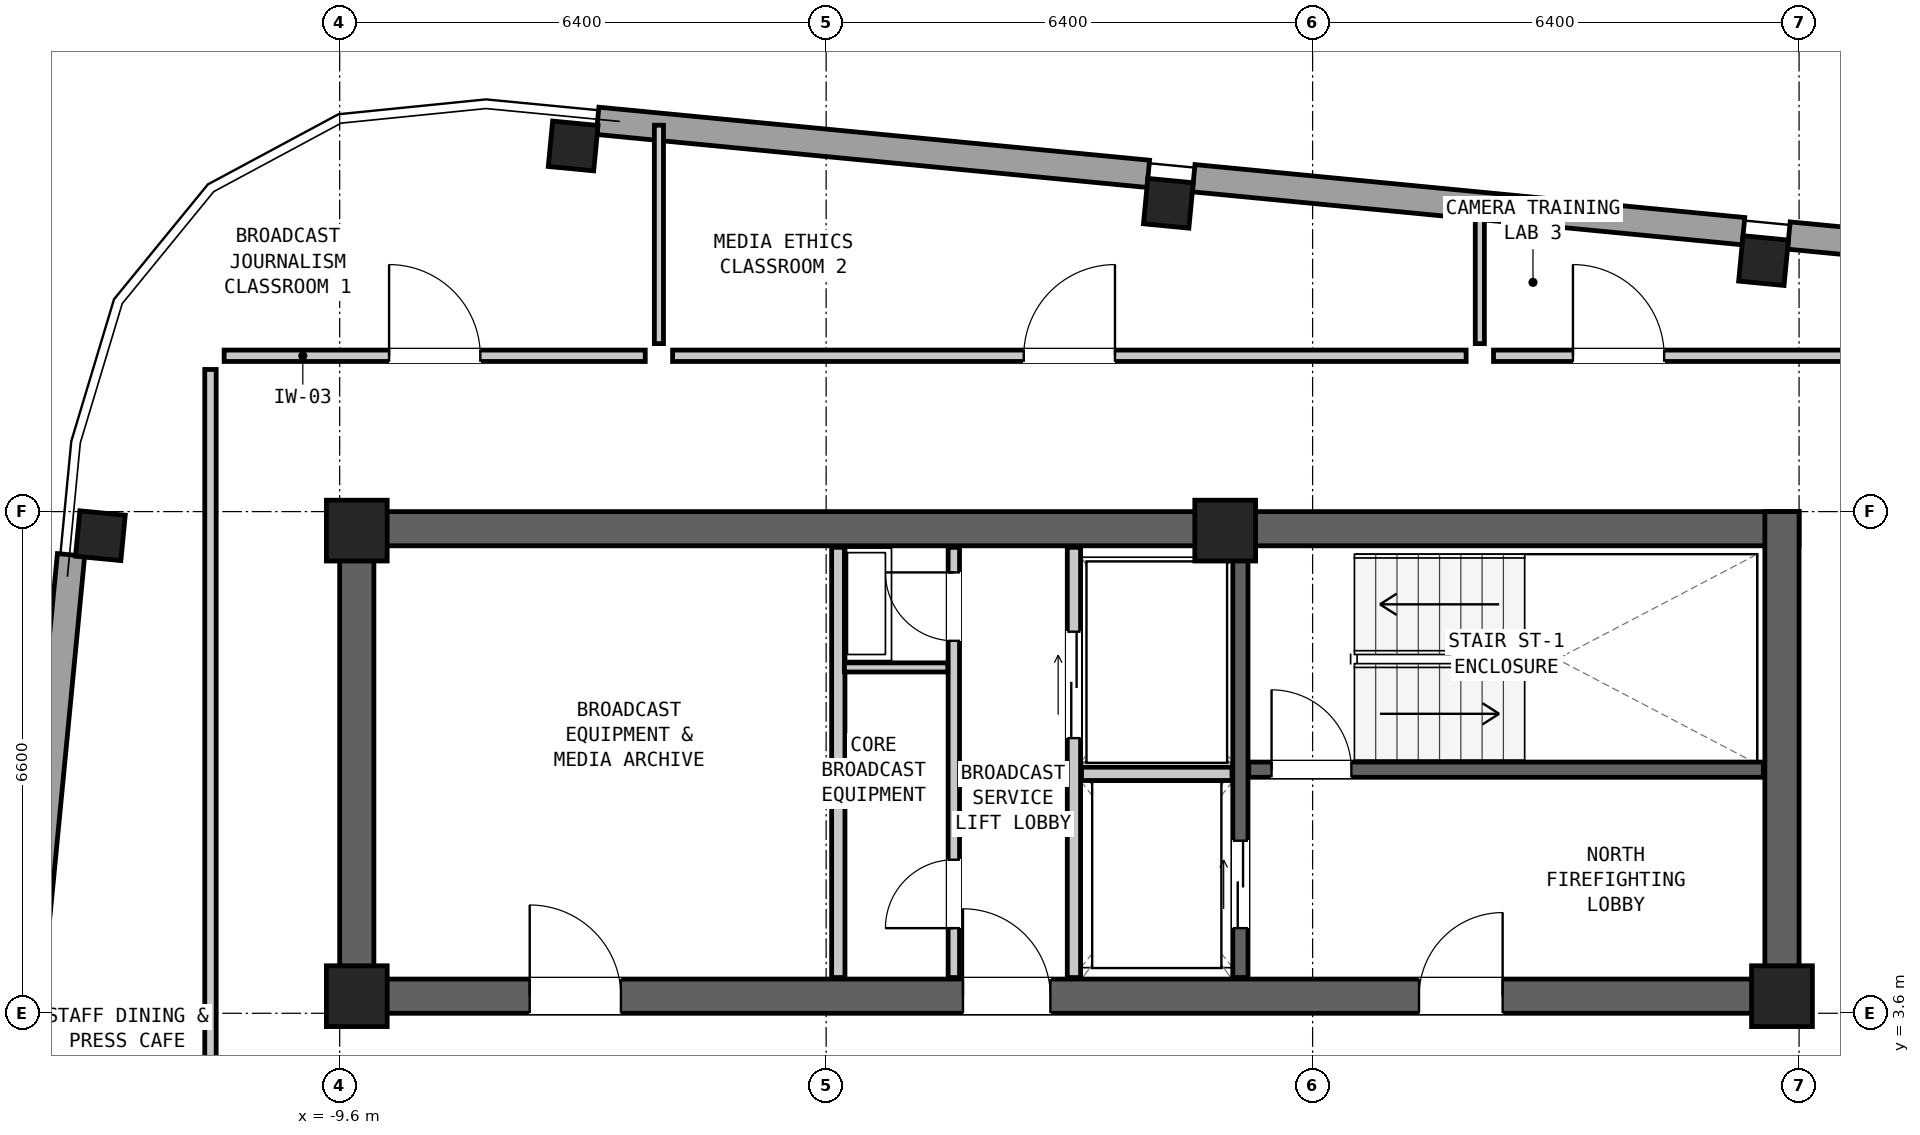
"""IFC4 building model, lengths in metres.
Left out: names, types, materials, properties, quantities, classifications, styles, units other than length and angle.
Written with IfcOpenShell. Run it as: python <this file> out.ifc"""

import sys

from ifc_helpers import new_model, si_unit, direction, frame, frame_2d, origin, origin_2d, place, context, subcontext, project, spatial, rectangle, hollow_rectangle, extrude, element, fill, save


model = new_model("IFC4")
c1 = context("Model", 3, precision=1e-05, world=origin(), true_north=direction((0.0, 1.0)))
c2 = subcontext(c1, "Body", "Model", "MODEL_VIEW")
j1 = project(units=[si_unit("LENGTHUNIT", "METRE"), si_unit("PLANEANGLEUNIT", "RADIAN")], contexts=[c1])
p1 = place(None, origin())
s1 = spatial("IfcSite", under=j1, at=p1, CompositionType="ELEMENT")
p2 = place(p1, origin())
s2 = spatial("IfcBuilding", under=s1, at=p2, CompositionType="ELEMENT")
p3 = place(p2, frame((0.0, 0.0, 267.25)))
s3 = spatial("IfcBuildingStorey", under=s2, at=p3, CompositionType="ELEMENT", Elevation=267.25)
p4 = place(p3, frame((-9.6, 9.975, 0.0), z_axis=(0.0, 0.0, 1.0), x_axis=(1.0, 0.0, 0.0)))
e1 = element("IfcWall", 1, at=p4, inside=s3, PredefinedType="SHEAR", context=c2, shape_type="SweptSolid", body=[
    extrude(rectangle(XDim=19.2, YDim=0.45, at=frame_2d((9.6, 0.0))), origin(), (0.0, 0.0, 1.0), 3.05),
])
p5 = place(p3, frame((-9.6, 3.825, 0.0), z_axis=(0.0, 0.0, 1.0), x_axis=(1.0, 0.0, 0.0)))
e2 = element("IfcWall", 2, at=p5, inside=s3, PredefinedType="SHEAR", context=c2, shape_type="SweptSolid", body=[
    extrude(rectangle(XDim=19.2, YDim=0.45, at=frame_2d((9.6, 0.0))), origin(), (0.0, 0.0, 1.0), 3.05),
])
p6 = place(p5, frame((14.2, 0.0, 0.0)))
e3 = element("IfcOpeningElement", 3, at=p6, cuts=e2, PredefinedType="OPENING", context=c2, shape_type="SweptSolid", body=[
    extrude(rectangle(XDim=1.1, YDim=2.08, at=frame_2d((0.55, 1.04))), frame((0.0, 0.237, 0.0), z_axis=(0.0, -1.0, 0.0), x_axis=(1.0, 0.0, 0.0)), (0.0, 0.0, 1.0), 0.474),
])
p7 = place(p5, frame((8.2, 0.0, 0.0)))
e4 = element("IfcOpeningElement", 4, at=p7, cuts=e2, PredefinedType="OPENING", context=c2, shape_type="SweptSolid", body=[
    extrude(rectangle(XDim=1.15, YDim=2.1, at=frame_2d((0.575, 1.05))), frame((0.0, 0.237, 0.0), z_axis=(0.0, -1.0, 0.0), x_axis=(1.0, 0.0, 0.0)), (0.0, 0.0, 1.0), 0.474),
])
p8 = place(p5, frame((2.5, 0.0, 0.0)))
e5 = element("IfcOpeningElement", 5, at=p8, cuts=e2, PredefinedType="OPENING", context=c2, shape_type="SweptSolid", body=[
    extrude(rectangle(XDim=1.2, YDim=2.1, at=frame_2d((0.6, 1.05))), frame((0.0, 0.237, 0.0), z_axis=(0.0, -1.0, 0.0), x_axis=(1.0, 0.0, 0.0)), (0.0, 0.0, 1.0), 0.474),
])
for number, where, z_axis, x_axis in (
    (6, (-9.375, 3.6, 0.0), (0.0, 0.0, 1.0), (0.0, 1.0, 0.0)),
    (7, (9.375, 3.6, 0.0), (0.0, 0.0, 1.0), (0.0, 1.0, 0.0)),
):
    element("IfcWall", number, at=place(p3, frame(where, z_axis=z_axis, x_axis=x_axis)), inside=s3, PredefinedType="SHEAR", context=c2, shape_type="SweptSolid", body=[
        extrude(rectangle(XDim=6.6, YDim=0.45, at=frame_2d((3.3, 0.0))), origin(), (0.0, 0.0, 1.0), 3.05),
    ])
for number, where, z_axis, x_axis in (
    (8, (9.133, 13.502, 0.0), (0.0, 0.0, 1.0), (0.995, -0.096, 0.0)),
    (9, (1.302, 14.256, 0.0), (0.0, 0.0, 1.0), (0.995, -0.096, 0.0)),
    (10, (-6.528, 15.01, 0.0), (0.0, 0.0, 1.0), (0.995, -0.096, 0.0)),
    (11, (-12.749, 9.883, 0.0), (0.0, 0.0, 1.0), (0.096, 0.995, 0.0)),
):
    element("IfcColumn", number, at=place(p3, frame(where, z_axis=z_axis, x_axis=x_axis)), inside=s3, PredefinedType="COLUMN", context=c2, shape_type="SweptSolid", body=[
        extrude(hollow_rectangle(XDim=0.6, YDim=0.6, WallThickness=0.04, at=origin_2d()), origin(), (0.0, 0.0, 1.0), 3.05),
    ])
for number, where, z_axis, x_axis in (
    (12, (-9.375, 9.95, 0.0), (0.0, 0.0, 1.0), (1.0, 0.0, 0.0)),
    (13, (2.05, 9.95, 0.0), (0.0, 0.0, 1.0), (1.0, 0.0, 0.0)),
    (14, (-9.375, 3.825, 0.0), (0.0, 0.0, 1.0), (1.0, 0.0, 0.0)),
    (15, (9.375, 3.825, 0.0), (0.0, 0.0, 1.0), (1.0, 0.0, 0.0)),
):
    element("IfcColumn", number, at=place(p3, frame(where, z_axis=z_axis, x_axis=x_axis)), inside=s3, PredefinedType="COLUMN", context=c2, shape_type="SweptSolid", body=[
        extrude(rectangle(XDim=0.8, YDim=0.8, at=origin_2d()), origin(), (0.0, 0.0, 1.0), 3.05),
    ])
p9 = place(p3, frame((-6.207, 15.341, 0.0), z_axis=(0.0, 0.0, 1.0), x_axis=(0.99539482255, -0.095860039857, 0.0)))
e16 = element("IfcWall", 16, at=p9, inside=s3, PredefinedType="SOLIDWALL", context=c2, shape_type="SweptSolid", body=[
    extrude(rectangle(XDim=7.279, YDim=0.36, at=frame_2d((3.639, 0.0))), origin(), (0.0, 0.0, 1.0), 0.98),
])
p10 = place(p3, frame((1.635, 14.586, 0.0), z_axis=(0.0, 0.0, 1.0), x_axis=(0.995398620126, -0.095820598258, 0.0)))
e17 = element("IfcWall", 17, at=p10, inside=s3, PredefinedType="SOLIDWALL", context=c2, shape_type="SweptSolid", body=[
    extrude(rectangle(XDim=7.267, YDim=0.36, at=frame_2d((3.633, 0.0))), origin(), (0.0, 0.0, 1.0), 0.98),
])
p11 = place(p3, frame((9.466, 13.832, 0.0), z_axis=(0.0, 0.0, 1.0), x_axis=(0.99539771442, -0.095830006406, 0.0)))
e18 = element("IfcWall", 18, at=p11, inside=s3, PredefinedType="SOLIDWALL", context=c2, shape_type="SweptSolid", body=[
    extrude(rectangle(XDim=7.279, YDim=0.36, at=frame_2d((3.639, 0.0))), origin(), (0.0, 0.0, 1.0), 0.98),
])
p12 = place(p3, frame((-13.832, 2.385, 0.0), z_axis=(0.0, 0.0, 1.0), x_axis=(0.095826806958, 0.995398022435, 0.0)))
e19 = element("IfcWall", 19, at=p12, inside=s3, PredefinedType="SOLIDWALL", context=c2, shape_type="SweptSolid", body=[
    extrude(rectangle(XDim=7.279, YDim=0.36, at=frame_2d((3.639, 0.0))), origin(), (0.0, 0.0, 1.0), 0.98),
])
p13 = place(p3, frame((2.36, 6.805, 0.0), z_axis=(0.0, 0.0, 1.0), x_axis=(1.0, 0.0, 0.0)))
e20 = element("IfcWall", 20, at=p13, inside=s3, PredefinedType="SHEAR", context=c2, shape_type="SweptSolid", body=[
    extrude(rectangle(XDim=6.77, YDim=0.2, at=frame_2d((3.385, 0.0))), origin(), (0.0, 0.0, 1.0), 2.86),
])
p14 = place(p13, frame((0.3, 0.0, 0.0)))
e21 = element("IfcOpeningElement", 21, at=p14, cuts=e20, PredefinedType="OPENING", context=c2, shape_type="SweptSolid", body=[
    extrude(rectangle(XDim=1.05, YDim=2.08, at=frame_2d((0.525, 1.04))), frame((0.0, 0.112, 0.0), z_axis=(0.0, -1.0, 0.0), x_axis=(1.0, 0.0, 0.0)), (0.0, 0.0, 1.0), 0.224),
])
p15 = place(p3, frame((2.25, 4.07, 0.0), z_axis=(0.0, 0.0, 1.0), x_axis=(0.0, 1.0, 0.0)))
e22 = element("IfcWall", 22, at=p15, inside=s3, PredefinedType="SHEAR", context=c2, shape_type="SweptSolid", body=[
    extrude(rectangle(XDim=5.66, YDim=0.2, at=frame_2d((2.83, 0.0))), origin(), (0.0, 0.0, 1.0), 2.86),
])
p16 = place(p15, frame((0.65, 0.0, 0.0)))
e23 = element("IfcOpeningElement", 23, at=p16, cuts=e22, PredefinedType="OPENING", context=c2, shape_type="SweptSolid", body=[
    extrude(rectangle(XDim=1.15, YDim=2.08, at=frame_2d((0.575, 1.04))), frame((0.0, 0.112, 0.0), z_axis=(0.0, -1.0, 0.0), x_axis=(1.0, 0.0, 0.0)), (0.0, 0.0, 1.0), 0.224),
])
p17 = place(p3, frame((0.06, 4.07, 0.0), z_axis=(0.0, 0.0, 1.0), x_axis=(0.0, 1.0, 0.0)))
e24 = element("IfcWall", 24, at=p17, inside=s3, PredefinedType="PARTITIONING", context=c2, shape_type="SweptSolid", body=[
    extrude(rectangle(XDim=5.66, YDim=0.175, at=frame_2d((2.83, 0.0))), origin(), (0.0, 0.0, 1.0), 2.86),
])
p18 = place(p17, frame((3.15, 0.0, 0.0)))
e25 = element("IfcOpeningElement", 25, at=p18, cuts=e24, PredefinedType="OPENING", context=c2, shape_type="SweptSolid", body=[
    extrude(rectangle(XDim=1.4, YDim=2.12, at=frame_2d((0.7, 1.06))), frame((0.0, 0.1, 0.0), z_axis=(0.0, -1.0, 0.0), x_axis=(1.0, 0.0, 0.0)), (0.0, 0.0, 1.0), 0.199),
])
p19 = place(p3, frame((0.16, 6.75, 0.0), z_axis=(0.0, 0.0, 1.0), x_axis=(1.0, 0.0, 0.0)))
e26 = element("IfcWall", 26, at=p19, inside=s3, PredefinedType="PARTITIONING", context=c2, shape_type="SweptSolid", body=[
    extrude(rectangle(XDim=1.98, YDim=0.175, at=frame_2d((0.99, 0.0))), origin(), (0.0, 0.0, 1.0), 2.86),
])
p20 = place(p3, frame((-3.04, 4.07, 0.0), z_axis=(0.0, 0.0, 1.0), x_axis=(0.0, 1.0, 0.0)))
e27 = element("IfcWall", 27, at=p20, inside=s3, PredefinedType="PARTITIONING", context=c2, shape_type="SweptSolid", body=[
    extrude(rectangle(XDim=5.66, YDim=0.175, at=frame_2d((2.83, 0.0))), origin(), (0.0, 0.0, 1.0), 2.86),
])
p21 = place(p3, frame((-1.52, 4.07, 0.0), z_axis=(0.0, 0.0, 1.0), x_axis=(0.0, 1.0, 0.0)))
e28 = element("IfcWall", 28, at=p21, inside=s3, PredefinedType="PARTITIONING", context=c2, shape_type="SweptSolid", body=[
    extrude(rectangle(XDim=5.66, YDim=0.15, at=frame_2d((2.83, 0.0))), origin(), (0.0, 0.0, 1.0), 2.86),
])
p22 = place(p21, frame((4.43, 0.0, 0.0)))
e29 = element("IfcOpeningElement", 29, at=p22, cuts=e28, PredefinedType="OPENING", context=c2, shape_type="SweptSolid", body=[
    extrude(rectangle(XDim=0.9, YDim=2.05, at=frame_2d((0.45, 1.025))), frame((0.0, 0.087, 0.0), z_axis=(0.0, -1.0, 0.0), x_axis=(1.0, 0.0, 0.0)), (0.0, 0.0, 1.0), 0.174),
])
p23 = place(p21, frame((0.65, 0.0, 0.0)))
e30 = element("IfcOpeningElement", 30, at=p23, cuts=e28, PredefinedType="OPENING", context=c2, shape_type="SweptSolid", body=[
    extrude(rectangle(XDim=0.9, YDim=2.05, at=frame_2d((0.45, 1.025))), frame((0.0, 0.087, 0.0), z_axis=(0.0, -1.0, 0.0), x_axis=(1.0, 0.0, 0.0)), (0.0, 0.0, 1.0), 0.174),
])
p24 = place(p3, frame((-2.96, 8.15, 0.0), z_axis=(0.0, 0.0, 1.0), x_axis=(1.0, 0.0, 0.0)))
e31 = element("IfcWall", 31, at=p24, inside=s3, PredefinedType="PARTITIONING", context=c2, shape_type="SweptSolid", body=[
    extrude(rectangle(XDim=1.36, YDim=0.12, at=frame_2d((0.68, 0.0))), origin(), (0.0, 0.0, 1.0), 2.86),
])
p25 = place(p3, frame((-5.4, 12.41, 0.0), z_axis=(0.0, 0.0, 1.0), x_axis=(0.0, 1.0, 0.0)))
e32 = element("IfcWall", 32, at=p25, inside=s3, PredefinedType="PARTITIONING", context=c2, shape_type="SweptSolid", body=[
    extrude(rectangle(XDim=2.874, YDim=0.12, at=frame_2d((1.437, 0.0))), origin(), (0.0, 0.0, 1.0), 2.86),
])
p26 = place(p3, frame((5.4, 12.41, 0.0), z_axis=(0.0, 0.0, 1.0), x_axis=(0.0, 1.0, 0.0)))
e33 = element("IfcWall", 33, at=p26, inside=s3, PredefinedType="PARTITIONING", context=c2, shape_type="SweptSolid", body=[
    extrude(rectangle(XDim=1.834, YDim=0.12, at=frame_2d((0.917, 0.0))), origin(), (0.0, 0.0, 1.0), 2.86),
])
p27 = place(p3, frame((-11.12, 12.25, 0.0), z_axis=(0.0, 0.0, 1.0), x_axis=(1.0, 0.0, 0.0)))
e34 = element("IfcWall", 34, at=p27, inside=s3, PredefinedType="PARTITIONING", context=c2, shape_type="SweptSolid", body=[
    extrude(rectangle(XDim=5.54, YDim=0.15, at=frame_2d((2.77, 0.0))), origin(), (0.0, 0.0, 1.0), 2.86),
])
p28 = place(p27, frame((2.17, 0.0, 0.0)))
e35 = element("IfcOpeningElement", 35, at=p28, cuts=e34, PredefinedType="OPENING", context=c2, shape_type="SweptSolid", body=[
    extrude(rectangle(XDim=1.2, YDim=2.1, at=frame_2d((0.6, 1.05))), frame((0.0, 0.087, 0.0), z_axis=(0.0, -1.0, 0.0), x_axis=(1.0, 0.0, 0.0)), (0.0, 0.0, 1.0), 0.174),
])
p29 = place(p3, frame((-5.22, 12.25, 0.0), z_axis=(0.0, 0.0, 1.0), x_axis=(1.0, 0.0, 0.0)))
e36 = element("IfcWall", 36, at=p29, inside=s3, PredefinedType="PARTITIONING", context=c2, shape_type="SweptSolid", body=[
    extrude(rectangle(XDim=10.44, YDim=0.15, at=frame_2d((5.22, 0.0))), origin(), (0.0, 0.0, 1.0), 2.86),
])
p30 = place(p29, frame((4.62, 0.0, 0.0)))
e37 = element("IfcOpeningElement", 37, at=p30, cuts=e36, PredefinedType="OPENING", context=c2, shape_type="SweptSolid", body=[
    extrude(rectangle(XDim=1.2, YDim=2.1, at=frame_2d((0.6, 1.05))), frame((0.0, 0.087, 0.0), z_axis=(0.0, -1.0, 0.0), x_axis=(1.0, 0.0, 0.0)), (0.0, 0.0, 1.0), 0.174),
])
p31 = place(p3, frame((5.58, 12.25, 0.0), z_axis=(0.0, 0.0, 1.0), x_axis=(1.0, 0.0, 0.0)))
e38 = element("IfcWall", 38, at=p31, inside=s3, PredefinedType="PARTITIONING", context=c2, shape_type="SweptSolid", body=[
    extrude(rectangle(XDim=5.89, YDim=0.15, at=frame_2d((2.945, 0.0))), origin(), (0.0, 0.0, 1.0), 2.86),
])
p32 = place(p31, frame((1.045, 0.0, 0.0)))
e39 = element("IfcOpeningElement", 39, at=p32, cuts=e38, PredefinedType="OPENING", context=c2, shape_type="SweptSolid", body=[
    extrude(rectangle(XDim=1.2, YDim=2.1, at=frame_2d((0.6, 1.05))), frame((0.0, 0.087, 0.0), z_axis=(0.0, -1.0, 0.0), x_axis=(1.0, 0.0, 0.0)), (0.0, 0.0, 1.0), 0.174),
])
p33 = place(p3, frame((-11.3, 12.07, 0.0), z_axis=(0.0, 0.0, 1.0), x_axis=(0.0, -1.0, 0.0)))
e40 = element("IfcWall", 40, at=p33, inside=s3, PredefinedType="PARTITIONING", context=c2, shape_type="SweptSolid", body=[
    extrude(rectangle(XDim=11.89, YDim=0.15, at=frame_2d((5.945, 0.0))), origin(), (0.0, 0.0, 1.0), 2.86),
])
p34 = place(p33, frame((9.625, 0.0, 0.0)))
e41 = element("IfcOpeningElement", 41, at=p34, cuts=e40, PredefinedType="OPENING", context=c2, shape_type="SweptSolid", body=[
    extrude(rectangle(XDim=1.2, YDim=2.1, at=frame_2d((0.6, 1.05))), frame((0.0, 0.087, 0.0), z_axis=(0.0, -1.0, 0.0), x_axis=(1.0, 0.0, 0.0)), (0.0, 0.0, 1.0), 0.174),
])
p35 = place(p14, origin())
e42 = element("IfcDoor", 42, at=p35, inside=s3, OperationType="SINGLE_SWING_LEFT", PredefinedType="DOOR", context=c2, shape_type="SweptSolid", body=[
    extrude(rectangle(XDim=1.05, YDim=2.08, at=frame_2d((0.525, 1.04))), frame((0.0, 0.025, 0.0), z_axis=(0.0, -1.0, 0.0), x_axis=(1.0, 0.0, 0.0)), (0.0, 0.0, 1.0), 0.05),
])
fill(e21, e42)
p36 = place(p6, origin())
e43 = element("IfcDoor", 43, at=p36, inside=s3, OperationType="SINGLE_SWING_RIGHT", PredefinedType="DOOR", context=c2, shape_type="SweptSolid", body=[
    extrude(rectangle(XDim=1.1, YDim=2.08, at=frame_2d((0.55, 1.04))), frame((0.0, 0.025, 0.0), z_axis=(0.0, -1.0, 0.0), x_axis=(1.0, 0.0, 0.0)), (0.0, 0.0, 1.0), 0.05),
])
fill(e3, e43)
p37 = place(p16, origin())
e44 = element("IfcDoor", 44, at=p37, inside=s3, OperationType="DOUBLE_DOOR_SLIDING", PredefinedType="DOOR", context=c2, shape_type="SweptSolid", body=[
    extrude(rectangle(XDim=1.15, YDim=2.08, at=frame_2d((0.575, 1.04))), frame((0.0, 0.025, 0.0), z_axis=(0.0, -1.0, 0.0), x_axis=(1.0, 0.0, 0.0)), (0.0, 0.0, 1.0), 0.05),
])
fill(e23, e44)
p38 = place(p18, origin())
e45 = element("IfcDoor", 45, at=p38, inside=s3, OperationType="DOUBLE_DOOR_SLIDING", PredefinedType="DOOR", context=c2, shape_type="SweptSolid", body=[
    extrude(rectangle(XDim=1.4, YDim=2.12, at=frame_2d((0.7, 1.06))), frame((0.0, 0.025, 0.0), z_axis=(0.0, -1.0, 0.0), x_axis=(1.0, 0.0, 0.0)), (0.0, 0.0, 1.0), 0.05),
])
fill(e25, e45)
p39 = place(p7, origin())
e46 = element("IfcDoor", 46, at=p39, inside=s3, OperationType="SINGLE_SWING_LEFT", PredefinedType="DOOR", context=c2, shape_type="SweptSolid", body=[
    extrude(rectangle(XDim=1.15, YDim=2.1, at=frame_2d((0.575, 1.05))), frame((0.0, 0.025, 0.0), z_axis=(0.0, -1.0, 0.0), x_axis=(1.0, 0.0, 0.0)), (0.0, 0.0, 1.0), 0.05),
])
fill(e4, e46)
p40 = place(p22, origin())
e47 = element("IfcDoor", 47, at=p40, inside=s3, OperationType="SINGLE_SWING_RIGHT", PredefinedType="DOOR", context=c2, shape_type="SweptSolid", body=[
    extrude(rectangle(XDim=0.9, YDim=2.05, at=frame_2d((0.45, 1.025))), frame((0.0, 0.025, 0.0), z_axis=(0.0, -1.0, 0.0), x_axis=(1.0, 0.0, 0.0)), (0.0, 0.0, 1.0), 0.05),
])
fill(e29, e47)
p41 = place(p23, origin())
e48 = element("IfcDoor", 48, at=p41, inside=s3, OperationType="SINGLE_SWING_LEFT", PredefinedType="DOOR", context=c2, shape_type="SweptSolid", body=[
    extrude(rectangle(XDim=0.9, YDim=2.05, at=frame_2d((0.45, 1.025))), frame((0.0, 0.025, 0.0), z_axis=(0.0, -1.0, 0.0), x_axis=(1.0, 0.0, 0.0)), (0.0, 0.0, 1.0), 0.05),
])
fill(e30, e48)
p42 = place(p8, origin())
e49 = element("IfcDoor", 49, at=p42, inside=s3, OperationType="SINGLE_SWING_LEFT", PredefinedType="DOOR", context=c2, shape_type="SweptSolid", body=[
    extrude(rectangle(XDim=1.2, YDim=2.1, at=frame_2d((0.6, 1.05))), frame((0.0, 0.025, 0.0), z_axis=(0.0, -1.0, 0.0), x_axis=(1.0, 0.0, 0.0)), (0.0, 0.0, 1.0), 0.05),
])
fill(e5, e49)
p43 = place(p28, origin())
e50 = element("IfcDoor", 50, at=p43, inside=s3, OperationType="SINGLE_SWING_LEFT", PredefinedType="DOOR", context=c2, shape_type="SweptSolid", body=[
    extrude(rectangle(XDim=1.2, YDim=2.1, at=frame_2d((0.6, 1.05))), frame((0.0, 0.025, 0.0), z_axis=(0.0, -1.0, 0.0), x_axis=(1.0, 0.0, 0.0)), (0.0, 0.0, 1.0), 0.05),
])
fill(e35, e50)
p44 = place(p30, origin())
e51 = element("IfcDoor", 51, at=p44, inside=s3, OperationType="SINGLE_SWING_RIGHT", PredefinedType="DOOR", context=c2, shape_type="SweptSolid", body=[
    extrude(rectangle(XDim=1.2, YDim=2.1, at=frame_2d((0.6, 1.05))), frame((0.0, 0.025, 0.0), z_axis=(0.0, -1.0, 0.0), x_axis=(1.0, 0.0, 0.0)), (0.0, 0.0, 1.0), 0.05),
])
fill(e37, e51)
p45 = place(p32, origin())
e52 = element("IfcDoor", 52, at=p45, inside=s3, OperationType="SINGLE_SWING_LEFT", PredefinedType="DOOR", context=c2, shape_type="SweptSolid", body=[
    extrude(rectangle(XDim=1.2, YDim=2.1, at=frame_2d((0.6, 1.05))), frame((0.0, 0.025, 0.0), z_axis=(0.0, -1.0, 0.0), x_axis=(1.0, 0.0, 0.0)), (0.0, 0.0, 1.0), 0.05),
])
fill(e39, e52)
save(model, sys.argv[1])
